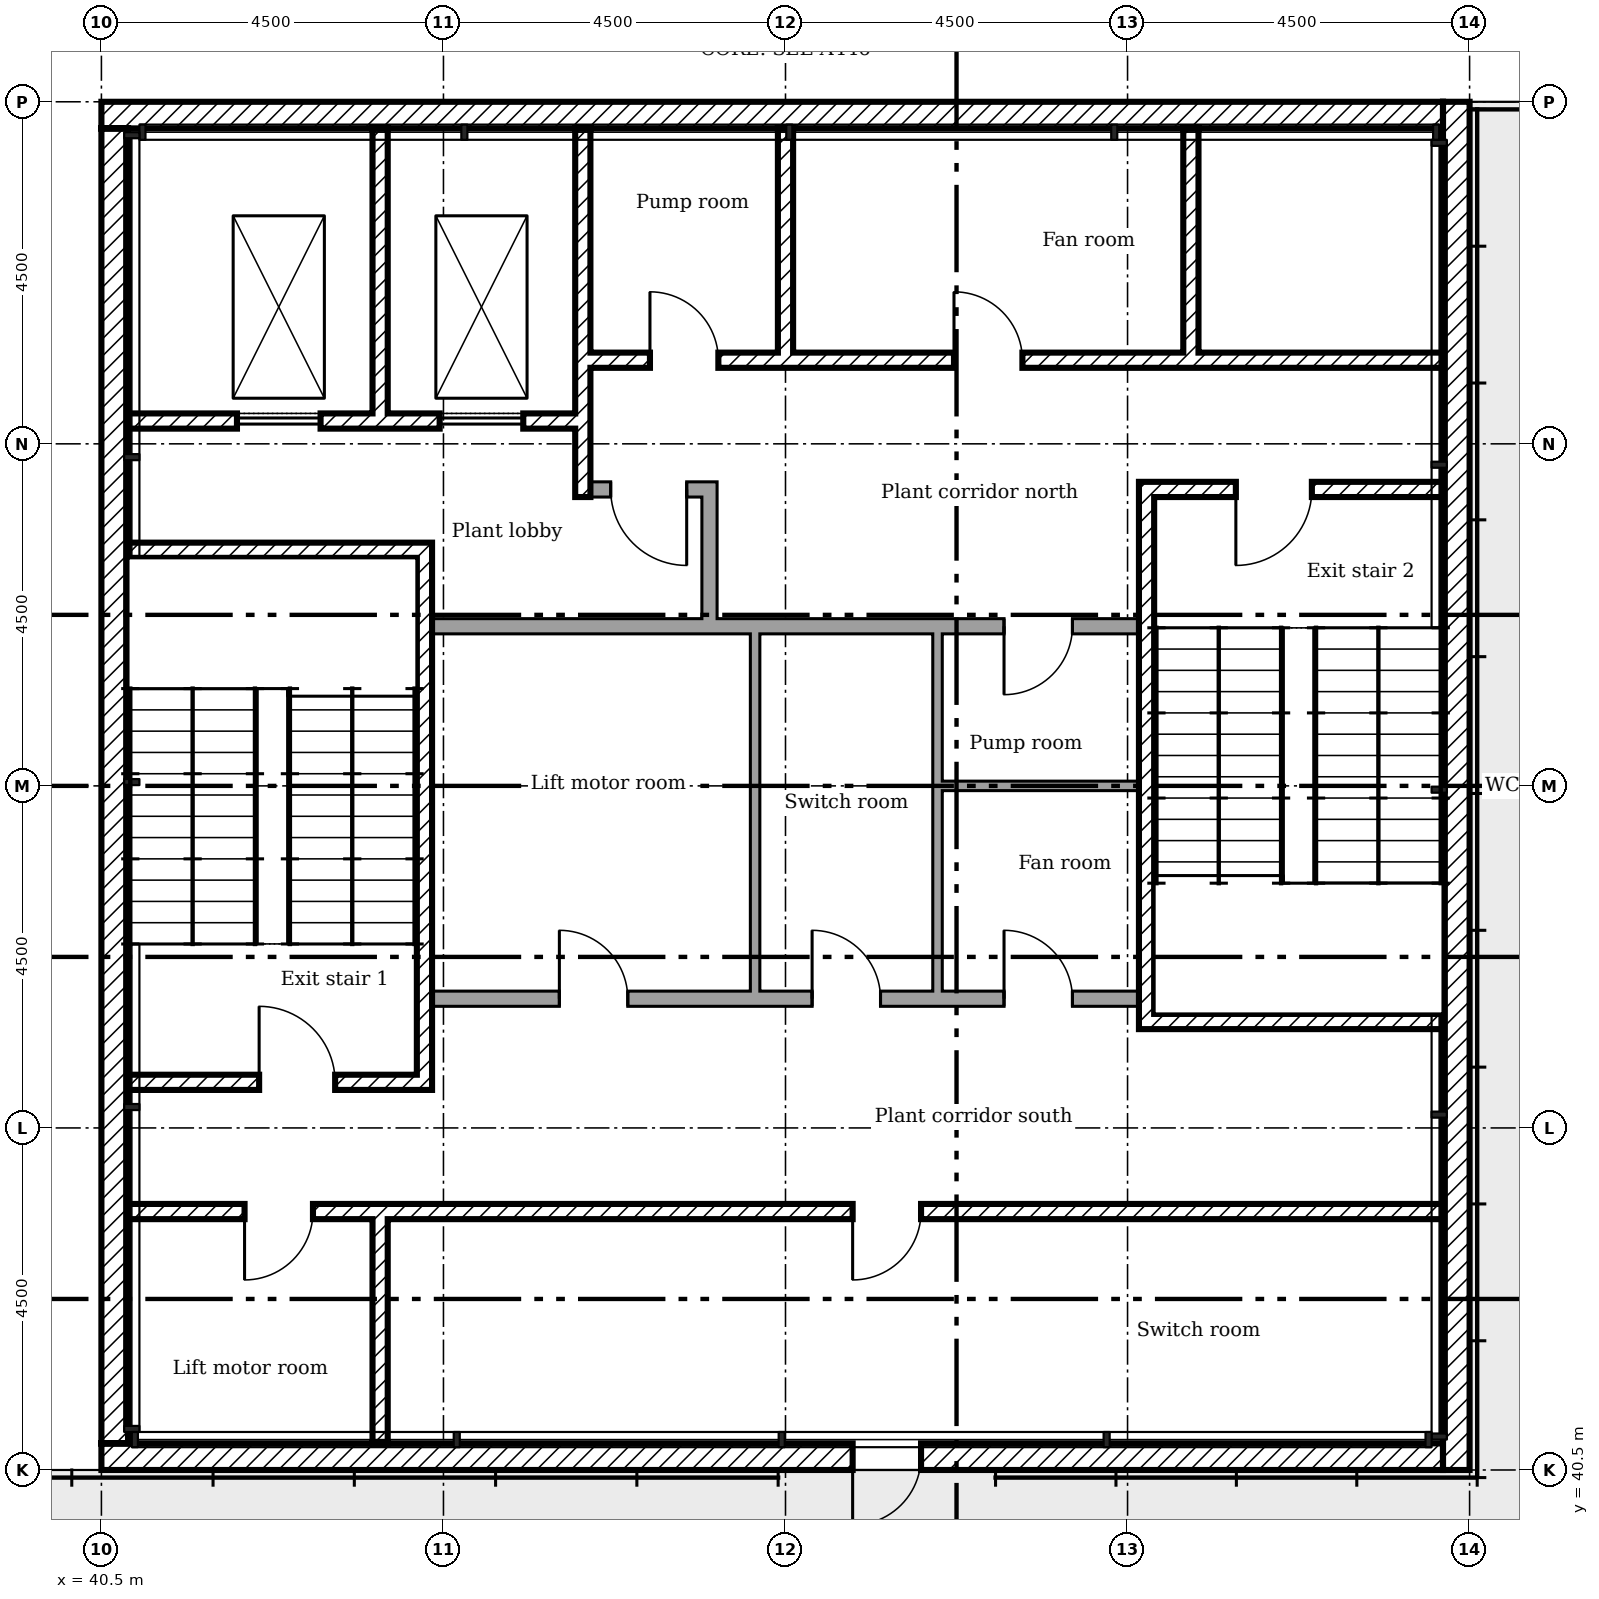
"""IFC4 building model, lengths in metres.
Left out: names, types, materials, properties, quantities, classifications, styles, units other than length and angle.
Written with IfcOpenShell. Run it as: python <this file> out.ifc"""

import sys

from ifc_helpers import new_model, si_unit, direction, frame, frame_2d, origin, place, context, subcontext, project, spatial, rectangle, extrude, element, fill, save


model = new_model("IFC4")
c1 = context("Model", 3, precision=1e-05, world=origin(), true_north=direction((0.0, 1.0)))
c2 = subcontext(c1, "Body", "Model", "MODEL_VIEW")
j1 = project(units=[si_unit("LENGTHUNIT", "METRE"), si_unit("PLANEANGLEUNIT", "RADIAN")], contexts=[c1])
p1 = place(None, origin())
s1 = spatial("IfcSite", under=j1, at=p1, CompositionType="ELEMENT")
p2 = place(p1, origin())
s2 = spatial("IfcBuilding", under=s1, at=p2, CompositionType="ELEMENT")
p3 = place(p2, frame((0.0, 0.0, 274.6)))
s3 = spatial("IfcBuildingStorey", under=s2, at=p3, CompositionType="ELEMENT", Elevation=274.6)
p4 = place(p3, frame((58.325, 40.5, 0.0), z_axis=(0.0, 0.0, 1.0), x_axis=(0.0, 1.0, 0.0)))
e1 = element("IfcWall", 1, at=p4, inside=s3, PredefinedType="SHEAR", context=c2, shape_type="SweptSolid", body=[
    extrude(rectangle(XDim=18.0, YDim=0.35, at=frame_2d((9.0, 0.0))), origin(), (0.0, 0.0, 1.0), 4.2),
])
p5 = place(p3, frame((40.5, 58.325, 0.0)))
e2 = element("IfcWall", 2, at=p5, inside=s3, PredefinedType="SHEAR", context=c2, shape_type="SweptSolid", body=[
    extrude(rectangle(XDim=17.65, YDim=0.35, at=frame_2d((8.825, 0.0))), origin(), (0.0, 0.0, 1.0), 4.2),
])
p6 = place(p3, frame((40.5, 40.675, 0.0)))
e3 = element("IfcWall", 3, at=p6, inside=s3, PredefinedType="SHEAR", context=c2, shape_type="SweptSolid", body=[
    extrude(rectangle(XDim=17.65, YDim=0.35, at=frame_2d((8.825, 0.0))), origin(), (0.0, 0.0, 1.0), 4.2),
])
p7 = place(p6, frame((9.883, 0.0, 0.0)))
e4 = element("IfcOpeningElement", 4, at=p7, cuts=e3, PredefinedType="OPENING", context=c2, shape_type="SweptSolid", body=[
    extrude(rectangle(XDim=0.9, YDim=2.1, at=frame_2d((0.45, 1.05))), frame((0.0, 0.185, 0.0), z_axis=(0.0, -1.0, 0.0), x_axis=(1.0, 0.0, 0.0)), (0.0, 0.0, 1.0), 0.37),
])
p8 = place(p3, frame((40.675, 40.85, 0.0), z_axis=(0.0, 0.0, 1.0), x_axis=(0.0, 1.0, 0.0)))
e5 = element("IfcWall", 5, at=p8, inside=s3, PredefinedType="SHEAR", context=c2, shape_type="SweptSolid", body=[
    extrude(rectangle(XDim=17.3, YDim=0.35, at=frame_2d((8.65, 0.0))), origin(), (0.0, 0.0, 1.0), 4.2),
])
p9 = place(p3, frame((44.167, 58.15, 0.0), z_axis=(0.0, 0.0, 1.0), x_axis=(0.0, -1.0, 0.0)))
e6 = element("IfcWall", 6, at=p9, inside=s3, PredefinedType="SHEAR", context=c2, shape_type="SweptSolid", body=[
    extrude(rectangle(XDim=3.75, YDim=0.2, at=frame_2d((1.875, 0.0))), origin(), (0.0, 0.0, 1.0), 4.2),
])
p10 = place(p3, frame((46.833, 58.15, 0.0), z_axis=(0.0, 0.0, 1.0), x_axis=(0.0, -1.0, 0.0)))
e7 = element("IfcWall", 7, at=p10, inside=s3, PredefinedType="SHEAR", context=c2, shape_type="SweptSolid", body=[
    extrude(rectangle(XDim=4.85, YDim=0.2, at=frame_2d((2.425, 0.0))), origin(), (0.0, 0.0, 1.0), 4.2),
])
for number, where, z_axis, x_axis in (
    (8, (49.5, 58.15, 0.0), (0.0, 0.0, 1.0), (0.0, -1.0, 0.0)),
    (9, (54.833, 58.15, 0.0), (0.0, 0.0, 1.0), (0.0, -1.0, 0.0)),
    (10, (44.167, 40.85, 0.0), (0.0, 0.0, 1.0), (0.0, 1.0, 0.0)),
):
    element("IfcWall", number, at=place(p3, frame(where, z_axis=z_axis, x_axis=x_axis)), inside=s3, PredefinedType="SHEAR", context=c2, shape_type="SweptSolid", body=[
        extrude(rectangle(XDim=2.95, YDim=0.2, at=frame_2d((1.475, 0.0))), origin(), (0.0, 0.0, 1.0), 4.2),
    ])
p11 = place(p3, frame((48.5, 51.6, 0.0), z_axis=(0.0, 0.0, 1.0), x_axis=(0.0, 1.0, 0.0)))
e11 = element("IfcWall", 11, at=p11, inside=s3, PredefinedType="PARTITIONING", context=c2, shape_type="SweptSolid", body=[
    extrude(rectangle(XDim=1.9, YDim=0.2, at=frame_2d((0.95, 0.0))), origin(), (0.0, 0.0, 1.0), 4.2),
])
p12 = place(p3, frame((46.933, 53.4, 0.0)))
e12 = element("IfcWall", 12, at=p12, inside=s3, PredefinedType="PARTITIONING", context=c2, shape_type="SweptSolid", body=[
    extrude(rectangle(XDim=1.467, YDim=0.2, at=frame_2d((0.733, 0.0))), origin(), (0.0, 0.0, 1.0), 4.2),
])
p13 = place(p12, frame((0.267, 0.0, 0.0)))
e13 = element("IfcOpeningElement", 13, at=p13, cuts=e12, PredefinedType="OPENING", context=c2, shape_type="SweptSolid", body=[
    extrude(rectangle(XDim=1.0, YDim=2.1, at=frame_2d((0.5, 1.05))), frame((0.0, 0.11, 0.0), z_axis=(0.0, -1.0, 0.0), x_axis=(1.0, 0.0, 0.0)), (0.0, 0.0, 1.0), 0.22),
])
p14 = place(p3, frame((46.933, 55.1, 0.0)))
e14 = element("IfcWall", 14, at=p14, inside=s3, PredefinedType="SHEAR", context=c2, shape_type="SweptSolid", body=[
    extrude(rectangle(XDim=11.217, YDim=0.2, at=frame_2d((5.608, 0.0))), origin(), (0.0, 0.0, 1.0), 4.2),
])
p15 = place(p14, frame((0.783, 0.0, 0.0)))
e15 = element("IfcOpeningElement", 15, at=p15, cuts=e14, PredefinedType="OPENING", context=c2, shape_type="SweptSolid", body=[
    extrude(rectangle(XDim=0.9, YDim=2.1, at=frame_2d((0.45, 1.05))), frame((0.0, 0.11, 0.0), z_axis=(0.0, -1.0, 0.0), x_axis=(1.0, 0.0, 0.0)), (0.0, 0.0, 1.0), 0.22),
])
p16 = place(p14, frame((4.783, 0.0, 0.0)))
e16 = element("IfcOpeningElement", 16, at=p16, cuts=e14, PredefinedType="OPENING", context=c2, shape_type="SweptSolid", body=[
    extrude(rectangle(XDim=0.9, YDim=2.1, at=frame_2d((0.45, 1.05))), frame((0.0, 0.11, 0.0), z_axis=(0.0, -1.0, 0.0), x_axis=(1.0, 0.0, 0.0)), (0.0, 0.0, 1.0), 0.22),
])
p17 = place(p3, frame((40.85, 54.3, 0.0)))
e17 = element("IfcWall", 17, at=p17, inside=s3, PredefinedType="SHEAR", context=c2, shape_type="SweptSolid", body=[
    extrude(rectangle(XDim=5.883, YDim=0.2, at=frame_2d((2.942, 0.0))), origin(), (0.0, 0.0, 1.0), 4.2),
])
p18 = place(p17, frame((1.433, 0.0, 0.0)))
e18 = element("IfcOpeningElement", 18, at=p18, cuts=e17, PredefinedType="OPENING", context=c2, shape_type="SweptSolid", body=[
    extrude(rectangle(XDim=1.1, YDim=2.1, at=frame_2d((0.55, 1.05))), frame((0.0, 0.11, 0.0), z_axis=(0.0, -1.0, 0.0), x_axis=(1.0, 0.0, 0.0)), (0.0, 0.0, 1.0), 0.22),
])
p19 = place(p17, frame((4.1, 0.0, 0.0)))
e19 = element("IfcOpeningElement", 19, at=p19, cuts=e17, PredefinedType="OPENING", context=c2, shape_type="SweptSolid", body=[
    extrude(rectangle(XDim=1.1, YDim=2.1, at=frame_2d((0.55, 1.05))), frame((0.0, 0.11, 0.0), z_axis=(0.0, -1.0, 0.0), x_axis=(1.0, 0.0, 0.0)), (0.0, 0.0, 1.0), 0.22),
])
p20 = place(p3, frame((40.85, 43.9, 0.0)))
e20 = element("IfcWall", 20, at=p20, inside=s3, PredefinedType="SHEAR", context=c2, shape_type="SweptSolid", body=[
    extrude(rectangle(XDim=17.3, YDim=0.2, at=frame_2d((8.65, 0.0))), origin(), (0.0, 0.0, 1.0), 4.2),
])
p21 = place(p20, frame((1.533, 0.0, 0.0)))
e21 = element("IfcOpeningElement", 21, at=p21, cuts=e20, PredefinedType="OPENING", context=c2, shape_type="SweptSolid", body=[
    extrude(rectangle(XDim=0.9, YDim=2.1, at=frame_2d((0.45, 1.05))), frame((0.0, 0.11, 0.0), z_axis=(0.0, -1.0, 0.0), x_axis=(1.0, 0.0, 0.0)), (0.0, 0.0, 1.0), 0.22),
])
p22 = place(p20, frame((9.533, 0.0, 0.0)))
e22 = element("IfcOpeningElement", 22, at=p22, cuts=e20, PredefinedType="OPENING", context=c2, shape_type="SweptSolid", body=[
    extrude(rectangle(XDim=0.9, YDim=2.1, at=frame_2d((0.45, 1.05))), frame((0.0, 0.11, 0.0), z_axis=(0.0, -1.0, 0.0), x_axis=(1.0, 0.0, 0.0)), (0.0, 0.0, 1.0), 0.22),
])
p23 = place(p3, frame((44.75, 45.5, 0.0), z_axis=(0.0, 0.0, 1.0), x_axis=(0.0, 1.0, 0.0)))
e23 = element("IfcWall", 23, at=p23, inside=s3, PredefinedType="SHEAR", context=c2, shape_type="SweptSolid", body=[
    extrude(rectangle(XDim=7.2, YDim=0.2, at=frame_2d((3.6, 0.0))), origin(), (0.0, 0.0, 1.0), 4.2),
])
p24 = place(p3, frame((40.85, 52.6, 0.0)))
e24 = element("IfcWall", 24, at=p24, inside=s3, PredefinedType="SHEAR", context=c2, shape_type="SweptSolid", body=[
    extrude(rectangle(XDim=3.8, YDim=0.2, at=frame_2d((1.9, 0.0))), origin(), (0.0, 0.0, 1.0), 4.2),
])
p25 = place(p3, frame((40.85, 45.6, 0.0)))
e25 = element("IfcWall", 25, at=p25, inside=s3, PredefinedType="SHEAR", context=c2, shape_type="SweptSolid", body=[
    extrude(rectangle(XDim=3.8, YDim=0.2, at=frame_2d((1.9, 0.0))), origin(), (0.0, 0.0, 1.0), 4.2),
])
p26 = place(p25, frame((1.725, 0.0, 0.0)))
e26 = element("IfcOpeningElement", 26, at=p26, cuts=e25, PredefinedType="OPENING", context=c2, shape_type="SweptSolid", body=[
    extrude(rectangle(XDim=1.0, YDim=2.1, at=frame_2d((0.5, 1.05))), frame((0.0, 0.11, 0.0), z_axis=(0.0, -1.0, 0.0), x_axis=(1.0, 0.0, 0.0)), (0.0, 0.0, 1.0), 0.22),
])
p27 = place(p3, frame((54.15, 53.4, 0.0)))
e27 = element("IfcWall", 27, at=p27, inside=s3, PredefinedType="SHEAR", context=c2, shape_type="SweptSolid", body=[
    extrude(rectangle(XDim=4.0, YDim=0.2, at=frame_2d((2.0, 0.0))), origin(), (0.0, 0.0, 1.0), 4.2),
])
p28 = place(p27, frame((1.275, 0.0, 0.0)))
e28 = element("IfcOpeningElement", 28, at=p28, cuts=e27, PredefinedType="OPENING", context=c2, shape_type="SweptSolid", body=[
    extrude(rectangle(XDim=1.0, YDim=2.1, at=frame_2d((0.5, 1.05))), frame((0.0, 0.11, 0.0), z_axis=(0.0, -1.0, 0.0), x_axis=(1.0, 0.0, 0.0)), (0.0, 0.0, 1.0), 0.22),
])
p29 = place(p3, frame((54.15, 46.4, 0.0)))
e29 = element("IfcWall", 29, at=p29, inside=s3, PredefinedType="SHEAR", context=c2, shape_type="SweptSolid", body=[
    extrude(rectangle(XDim=4.0, YDim=0.2, at=frame_2d((2.0, 0.0))), origin(), (0.0, 0.0, 1.0), 4.2),
])
p30 = place(p3, frame((54.25, 46.5, 0.0), z_axis=(0.0, 0.0, 1.0), x_axis=(0.0, 1.0, 0.0)))
e30 = element("IfcWall", 30, at=p30, inside=s3, PredefinedType="SHEAR", context=c2, shape_type="SweptSolid", body=[
    extrude(rectangle(XDim=6.8, YDim=0.2, at=frame_2d((3.4, 0.0))), origin(), (0.0, 0.0, 1.0), 4.2),
])
p31 = place(p3, frame((44.85, 51.6, 0.0)))
e31 = element("IfcWall", 31, at=p31, inside=s3, PredefinedType="PARTITIONING", context=c2, shape_type="SweptSolid", body=[
    extrude(rectangle(XDim=9.3, YDim=0.2, at=frame_2d((4.65, 0.0))), origin(), (0.0, 0.0, 1.0), 4.2),
])
p32 = place(p31, frame((7.525, 0.0, 0.0)))
e32 = element("IfcOpeningElement", 32, at=p32, cuts=e31, PredefinedType="OPENING", context=c2, shape_type="SweptSolid", body=[
    extrude(rectangle(XDim=0.9, YDim=2.1, at=frame_2d((0.45, 1.05))), frame((0.0, 0.11, 0.0), z_axis=(0.0, -1.0, 0.0), x_axis=(1.0, 0.0, 0.0)), (0.0, 0.0, 1.0), 0.22),
])
p33 = place(p3, frame((44.85, 46.7, 0.0)))
e33 = element("IfcWall", 33, at=p33, inside=s3, PredefinedType="PARTITIONING", context=c2, shape_type="SweptSolid", body=[
    extrude(rectangle(XDim=9.3, YDim=0.2, at=frame_2d((4.65, 0.0))), origin(), (0.0, 0.0, 1.0), 4.2),
])
p34 = place(p33, frame((1.675, 0.0, 0.0)))
e34 = element("IfcOpeningElement", 34, at=p34, cuts=e33, PredefinedType="OPENING", context=c2, shape_type="SweptSolid", body=[
    extrude(rectangle(XDim=0.9, YDim=2.1, at=frame_2d((0.45, 1.05))), frame((0.0, 0.11, 0.0), z_axis=(0.0, -1.0, 0.0), x_axis=(1.0, 0.0, 0.0)), (0.0, 0.0, 1.0), 0.22),
])
p35 = place(p33, frame((5.0, 0.0, 0.0)))
e35 = element("IfcOpeningElement", 35, at=p35, cuts=e33, PredefinedType="OPENING", context=c2, shape_type="SweptSolid", body=[
    extrude(rectangle(XDim=0.9, YDim=2.1, at=frame_2d((0.45, 1.05))), frame((0.0, 0.11, 0.0), z_axis=(0.0, -1.0, 0.0), x_axis=(1.0, 0.0, 0.0)), (0.0, 0.0, 1.0), 0.22),
])
p36 = place(p33, frame((7.525, 0.0, 0.0)))
e36 = element("IfcOpeningElement", 36, at=p36, cuts=e33, PredefinedType="OPENING", context=c2, shape_type="SweptSolid", body=[
    extrude(rectangle(XDim=0.9, YDim=2.1, at=frame_2d((0.45, 1.05))), frame((0.0, 0.11, 0.0), z_axis=(0.0, -1.0, 0.0), x_axis=(1.0, 0.0, 0.0)), (0.0, 0.0, 1.0), 0.22),
])
p37 = place(p3, frame((49.1, 46.8, 0.0), z_axis=(0.0, 0.0, 1.0), x_axis=(0.0, 1.0, 0.0)))
e37 = element("IfcWall", 37, at=p37, inside=s3, PredefinedType="PARTITIONING", context=c2, shape_type="SweptSolid", body=[
    extrude(rectangle(XDim=4.7, YDim=0.125, at=frame_2d((2.35, 0.0))), origin(), (0.0, 0.0, 1.0), 4.2),
])
p38 = place(p3, frame((51.5, 46.8, 0.0), z_axis=(0.0, 0.0, 1.0), x_axis=(0.0, 1.0, 0.0)))
e38 = element("IfcWall", 38, at=p38, inside=s3, PredefinedType="PARTITIONING", context=c2, shape_type="SweptSolid", body=[
    extrude(rectangle(XDim=2.762, YDim=0.125, at=frame_2d((1.381, 0.0))), origin(), (0.0, 0.0, 1.0), 4.2),
])
p39 = place(p3, frame((51.562, 49.5, 0.0)))
e39 = element("IfcWall", 39, at=p39, inside=s3, PredefinedType="PARTITIONING", context=c2, shape_type="SweptSolid", body=[
    extrude(rectangle(XDim=2.587, YDim=0.125, at=frame_2d((1.294, 0.0))), origin(), (0.0, 0.0, 1.0), 4.2),
])
p40 = place(p3, frame((51.5, 49.5, 0.0), z_axis=(0.0, 0.0, 1.0), x_axis=(0.0, 1.0, 0.0)))
e40 = element("IfcWall", 40, at=p40, inside=s3, PredefinedType="PARTITIONING", context=c2, shape_type="SweptSolid", body=[
    extrude(rectangle(XDim=2.0, YDim=0.125, at=frame_2d((1.0, 0.0))), origin(), (0.0, 0.0, 1.0), 4.2),
])
p41 = place(p7, frame((0.9, 0.0, 0.0), x_axis=(-1.0, 0.0, 0.0)))
e41 = element("IfcDoor", 41, at=p41, inside=s3, OperationType="SINGLE_SWING_LEFT", PredefinedType="DOOR", context=c2, shape_type="SweptSolid", body=[
    extrude(rectangle(XDim=0.9, YDim=2.1, at=frame_2d((0.45, 1.05))), frame((0.0, 0.025, 0.0), z_axis=(0.0, -1.0, 0.0), x_axis=(1.0, 0.0, 0.0)), (0.0, 0.0, 1.0), 0.05),
])
fill(e4, e41)
p42 = place(p26, origin())
e42 = element("IfcDoor", 42, at=p42, inside=s3, OperationType="SINGLE_SWING_RIGHT", PredefinedType="DOOR", context=c2, shape_type="SweptSolid", body=[
    extrude(rectangle(XDim=1.0, YDim=2.1, at=frame_2d((0.5, 1.05))), frame((0.0, 0.025, 0.0), z_axis=(0.0, -1.0, 0.0), x_axis=(1.0, 0.0, 0.0)), (0.0, 0.0, 1.0), 0.05),
])
fill(e26, e42)
p43 = place(p28, frame((1.0, 0.0, 0.0), x_axis=(-1.0, 0.0, 0.0)))
e43 = element("IfcDoor", 43, at=p43, inside=s3, OperationType="SINGLE_SWING_LEFT", PredefinedType="DOOR", context=c2, shape_type="SweptSolid", body=[
    extrude(rectangle(XDim=1.0, YDim=2.1, at=frame_2d((0.5, 1.05))), frame((0.0, 0.025, 0.0), z_axis=(0.0, -1.0, 0.0), x_axis=(1.0, 0.0, 0.0)), (0.0, 0.0, 1.0), 0.05),
])
fill(e28, e43)
p44 = place(p13, frame((1.0, 0.0, 0.0), x_axis=(-1.0, 0.0, 0.0)))
e44 = element("IfcDoor", 44, at=p44, inside=s3, OperationType="SINGLE_SWING_RIGHT", PredefinedType="DOOR", context=c2, shape_type="SweptSolid", body=[
    extrude(rectangle(XDim=1.0, YDim=2.1, at=frame_2d((0.5, 1.05))), frame((0.0, 0.025, 0.0), z_axis=(0.0, -1.0, 0.0), x_axis=(1.0, 0.0, 0.0)), (0.0, 0.0, 1.0), 0.05),
])
fill(e13, e44)
p45 = place(p15, origin())
e45 = element("IfcDoor", 45, at=p45, inside=s3, OperationType="SINGLE_SWING_RIGHT", PredefinedType="DOOR", context=c2, shape_type="SweptSolid", body=[
    extrude(rectangle(XDim=0.9, YDim=2.1, at=frame_2d((0.45, 1.05))), frame((0.0, 0.025, 0.0), z_axis=(0.0, -1.0, 0.0), x_axis=(1.0, 0.0, 0.0)), (0.0, 0.0, 1.0), 0.05),
])
fill(e15, e45)
p46 = place(p16, origin())
e46 = element("IfcDoor", 46, at=p46, inside=s3, OperationType="SINGLE_SWING_RIGHT", PredefinedType="DOOR", context=c2, shape_type="SweptSolid", body=[
    extrude(rectangle(XDim=0.9, YDim=2.1, at=frame_2d((0.45, 1.05))), frame((0.0, 0.025, 0.0), z_axis=(0.0, -1.0, 0.0), x_axis=(1.0, 0.0, 0.0)), (0.0, 0.0, 1.0), 0.05),
])
fill(e16, e46)
p47 = place(p21, frame((0.9, 0.0, 0.0), x_axis=(-1.0, 0.0, 0.0)))
e47 = element("IfcDoor", 47, at=p47, inside=s3, OperationType="SINGLE_SWING_LEFT", PredefinedType="DOOR", context=c2, shape_type="SweptSolid", body=[
    extrude(rectangle(XDim=0.9, YDim=2.1, at=frame_2d((0.45, 1.05))), frame((0.0, 0.025, 0.0), z_axis=(0.0, -1.0, 0.0), x_axis=(1.0, 0.0, 0.0)), (0.0, 0.0, 1.0), 0.05),
])
fill(e21, e47)
p48 = place(p22, frame((0.9, 0.0, 0.0), x_axis=(-1.0, 0.0, 0.0)))
e48 = element("IfcDoor", 48, at=p48, inside=s3, OperationType="SINGLE_SWING_LEFT", PredefinedType="DOOR", context=c2, shape_type="SweptSolid", body=[
    extrude(rectangle(XDim=0.9, YDim=2.1, at=frame_2d((0.45, 1.05))), frame((0.0, 0.025, 0.0), z_axis=(0.0, -1.0, 0.0), x_axis=(1.0, 0.0, 0.0)), (0.0, 0.0, 1.0), 0.05),
])
fill(e22, e48)
p49 = place(p34, origin())
e49 = element("IfcDoor", 49, at=p49, inside=s3, OperationType="SINGLE_SWING_RIGHT", PredefinedType="DOOR", context=c2, shape_type="SweptSolid", body=[
    extrude(rectangle(XDim=0.9, YDim=2.1, at=frame_2d((0.45, 1.05))), frame((0.0, 0.025, 0.0), z_axis=(0.0, -1.0, 0.0), x_axis=(1.0, 0.0, 0.0)), (0.0, 0.0, 1.0), 0.05),
])
fill(e34, e49)
p50 = place(p35, origin())
e50 = element("IfcDoor", 50, at=p50, inside=s3, OperationType="SINGLE_SWING_RIGHT", PredefinedType="DOOR", context=c2, shape_type="SweptSolid", body=[
    extrude(rectangle(XDim=0.9, YDim=2.1, at=frame_2d((0.45, 1.05))), frame((0.0, 0.025, 0.0), z_axis=(0.0, -1.0, 0.0), x_axis=(1.0, 0.0, 0.0)), (0.0, 0.0, 1.0), 0.05),
])
fill(e35, e50)
p51 = place(p32, frame((0.9, 0.0, 0.0), x_axis=(-1.0, 0.0, 0.0)))
e51 = element("IfcDoor", 51, at=p51, inside=s3, OperationType="SINGLE_SWING_LEFT", PredefinedType="DOOR", context=c2, shape_type="SweptSolid", body=[
    extrude(rectangle(XDim=0.9, YDim=2.1, at=frame_2d((0.45, 1.05))), frame((0.0, 0.025, 0.0), z_axis=(0.0, -1.0, 0.0), x_axis=(1.0, 0.0, 0.0)), (0.0, 0.0, 1.0), 0.05),
])
fill(e32, e51)
p52 = place(p36, origin())
e52 = element("IfcDoor", 52, at=p52, inside=s3, OperationType="SINGLE_SWING_RIGHT", PredefinedType="DOOR", context=c2, shape_type="SweptSolid", body=[
    extrude(rectangle(XDim=0.9, YDim=2.1, at=frame_2d((0.45, 1.05))), frame((0.0, 0.025, 0.0), z_axis=(0.0, -1.0, 0.0), x_axis=(1.0, 0.0, 0.0)), (0.0, 0.0, 1.0), 0.05),
])
fill(e36, e52)
p53 = place(p18, origin())
e53 = element("IfcDoor", 53, at=p53, inside=s3, OperationType="SLIDING_TO_LEFT", PredefinedType="DOOR", context=c2, shape_type="SweptSolid", body=[
    extrude(rectangle(XDim=1.1, YDim=2.1, at=frame_2d((0.55, 1.05))), frame((0.0, 0.025, 0.0), z_axis=(0.0, -1.0, 0.0), x_axis=(1.0, 0.0, 0.0)), (0.0, 0.0, 1.0), 0.05),
])
fill(e18, e53)
p54 = place(p19, origin())
e54 = element("IfcDoor", 54, at=p54, inside=s3, OperationType="SLIDING_TO_LEFT", PredefinedType="DOOR", context=c2, shape_type="SweptSolid", body=[
    extrude(rectangle(XDim=1.1, YDim=2.1, at=frame_2d((0.55, 1.05))), frame((0.0, 0.025, 0.0), z_axis=(0.0, -1.0, 0.0), x_axis=(1.0, 0.0, 0.0)), (0.0, 0.0, 1.0), 0.05),
])
fill(e19, e54)
save(model, sys.argv[1])
